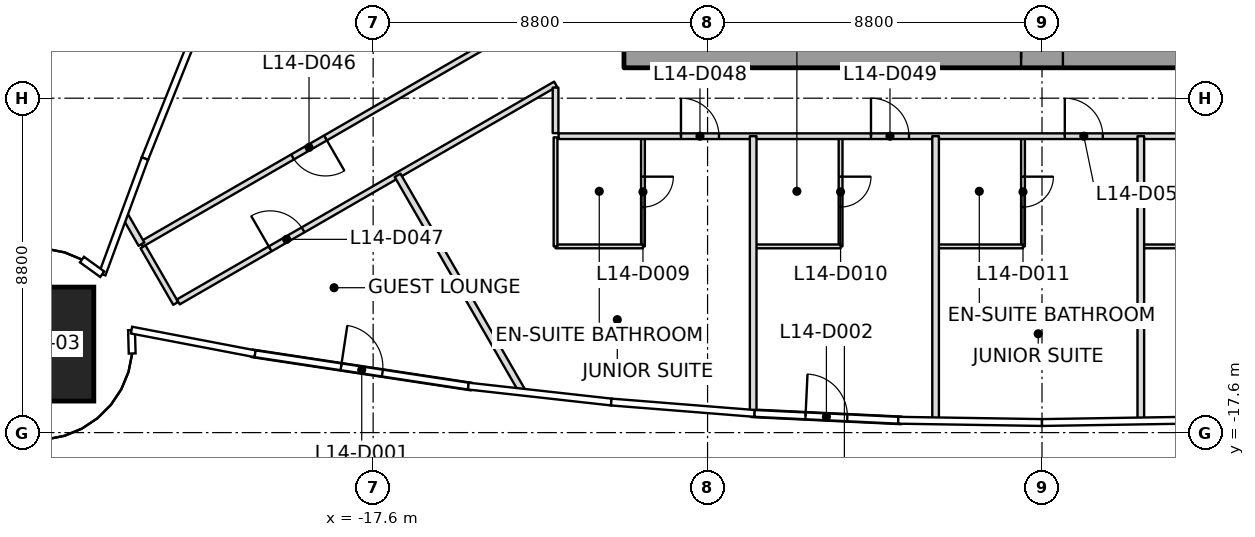
"""IFC4 building model, lengths in metres.
Left out: names, types, materials, properties, quantities, classifications, styles, units other than length and angle.
Written with IfcOpenShell. Run it as: python <this file> out.ifc"""

import sys

from ifc_helpers import new_model, si_unit, direction, frame, frame_2d, origin, origin_2d, place, context, subcontext, project, spatial, rectangle, extrude, element, fill, save


model = new_model("IFC4")
c1 = context("Model", 3, precision=1e-05, world=origin(), true_north=direction((0.0, 1.0)))
c2 = subcontext(c1, "Body", "Model", "MODEL_VIEW")
j1 = project(units=[si_unit("LENGTHUNIT", "METRE"), si_unit("PLANEANGLEUNIT", "RADIAN")], contexts=[c1])
p1 = place(None, origin())
s1 = spatial("IfcSite", under=j1, at=p1, CompositionType="ELEMENT")
p2 = place(p1, origin())
s2 = spatial("IfcBuilding", under=s1, at=p2, CompositionType="ELEMENT")
p3 = place(p2, frame((0.0, 0.0, 73.9)))
s3 = spatial("IfcBuildingStorey", under=s2, at=p3, CompositionType="ELEMENT", Elevation=73.9)
p4 = place(p3, frame((-26.45, -15.271, 0.0), z_axis=(0.030529980019, 0.017605841609, 0.999378784376), x_axis=(0.999533851513, -0.000537756667, -0.030525243614)))
e1 = element("IfcColumn", 1, at=p4, inside=s3, PredefinedType="COLUMN", context=c2, shape_type="SweptSolid", body=[
    extrude(rectangle(XDim=3.0, YDim=3.0, at=origin_2d()), origin(), (0.0, 0.0, 1.0), 3.702),
])
p5 = place(p3, frame((-11.0, -7.75, 0.0), z_axis=(0.0, 0.0, 1.0), x_axis=(1.0, 0.0, 0.0)))
e2 = element("IfcWall", 2, at=p5, inside=s3, PredefinedType="SHEAR", context=c2, shape_type="SweptSolid", body=[
    extrude(rectangle(XDim=22.0, YDim=0.5, at=frame_2d((11.0, 0.0))), origin(), (0.0, 0.0, 1.0), 3.7),
])
p6 = place(p5, frame((10.45, 0.0, 0.0)))
e3 = element("IfcOpeningElement", 3, at=p6, cuts=e2, PredefinedType="OPENING", context=c2, shape_type="SweptSolid", body=[
    extrude(rectangle(XDim=1.1, YDim=2.1, at=frame_2d((0.55, 1.05))), frame((0.0, 0.25, 0.0), z_axis=(0.0, -1.0, 0.0), x_axis=(1.0, 0.0, 0.0)), (0.0, 0.0, 1.0), 0.5),
])
p7 = place(p3, frame((-20.795, -15.512, 0.0), z_axis=(0.0, 0.0, 1.0), x_axis=(0.988688163598, -0.149985716522, 0.0)))
e4 = element("IfcWall", 4, at=p7, inside=s3, PredefinedType="SOLIDWALL", context=c2, shape_type="SweptSolid", body=[
    extrude(rectangle(XDim=5.855, YDim=0.2, at=frame_2d((2.927, 0.0))), origin(), (0.0, 0.0, 1.0), 3.04),
])
p8 = place(p7, frame((2.378, 0.0, 0.0)))
e5 = element("IfcOpeningElement", 5, at=p8, cuts=e4, PredefinedType="OPENING", context=c2, shape_type="SweptSolid", body=[
    extrude(rectangle(XDim=1.1, YDim=2.1, at=frame_2d((0.55, 1.05))), frame((0.0, 0.1, 0.0), z_axis=(0.0, -1.0, 0.0), x_axis=(1.0, 0.0, 0.0)), (0.0, 0.0, 1.0), 0.2),
])
p9 = place(p3, frame((-7.653, -17.091, 0.0), z_axis=(0.0, 0.0, 1.0), x_axis=(0.998868834381, -0.047550517367, 0.0)))
e6 = element("IfcWall", 6, at=p9, inside=s3, PredefinedType="SOLIDWALL", context=c2, shape_type="SweptSolid", body=[
    extrude(rectangle(XDim=3.964, YDim=0.2, at=frame_2d((1.982, 0.0))), origin(), (0.0, 0.0, 1.0), 2.947),
])
p10 = place(p9, frame((1.432, 0.0, 0.0)))
e7 = element("IfcOpeningElement", 7, at=p10, cuts=e6, PredefinedType="OPENING", context=c2, shape_type="SweptSolid", body=[
    extrude(rectangle(XDim=1.1, YDim=2.1, at=frame_2d((0.55, 1.05))), frame((0.0, 0.1, 0.0), z_axis=(0.0, -1.0, 0.0), x_axis=(1.0, 0.0, 0.0)), (0.0, 0.0, 1.0), 0.2),
])
p11 = place(p3, frame((-23.695, -12.641, 0.0), z_axis=(0.0, 0.0, 1.0), x_axis=(-0.500122219575, 0.86595482878, 0.0)))
e8 = element("IfcWall", 8, at=p11, inside=s3, PredefinedType="PARTITIONING", context=c2, shape_type="SweptSolid", body=[
    extrude(rectangle(XDim=0.916, YDim=0.175, at=frame_2d((0.458, 0.0))), origin(), (0.0, 0.0, 1.0), 3.15),
])
p12 = place(p3, frame((-13.655, -16.549, 0.0), z_axis=(0.0, 0.0, 1.0), x_axis=(-0.499999794657, 0.866025522339, 0.0)))
e9 = element("IfcWall", 9, at=p12, inside=s3, PredefinedType="PARTITIONING", context=c2, shape_type="SweptSolid", body=[
    extrude(rectangle(XDim=6.604, YDim=0.175, at=frame_2d((3.302, 0.0))), origin(), (0.0, 0.0, 1.0), 2.797),
])
p13 = place(p3, frame((-7.6, -9.8, 0.0), z_axis=(0.0, 0.0, 1.0), x_axis=(0.0, -1.0, 0.0)))
e10 = element("IfcWall", 10, at=p13, inside=s3, PredefinedType="PARTITIONING", context=c2, shape_type="SweptSolid", body=[
    extrude(rectangle(XDim=7.292, YDim=0.175, at=frame_2d((3.646, 0.0))), origin(), (0.0, 0.0, 1.0), 3.15),
])
p14 = place(p3, frame((-2.8, -9.8, 0.0), z_axis=(0.0, 0.0, 1.0), x_axis=(0.0, -1.0, 0.0)))
e11 = element("IfcWall", 11, at=p14, inside=s3, PredefinedType="PARTITIONING", context=c2, shape_type="SweptSolid", body=[
    extrude(rectangle(XDim=7.498, YDim=0.175, at=frame_2d((3.749, 0.0))), origin(), (0.0, 0.0, 1.0), 3.15),
])
p15 = place(p3, frame((2.6, -9.8, 0.0), z_axis=(0.0, 0.0, 1.0), x_axis=(0.0, -1.0, 0.0)))
e12 = element("IfcWall", 12, at=p15, inside=s3, PredefinedType="PARTITIONING", context=c2, shape_type="SweptSolid", body=[
    extrude(rectangle(XDim=7.503, YDim=0.175, at=frame_2d((3.751, 0.0))), origin(), (0.0, 0.0, 1.0), 3.15),
])
p16 = place(p3, frame((-12.8, -6.351, 0.0), z_axis=(0.0, 0.0, 1.0), x_axis=(-0.866020449901, -0.50000858028, 0.0)))
e13 = element("IfcWall", 13, at=p16, inside=s3, PredefinedType="PARTITIONING", context=c2, shape_type="SweptSolid", body=[
    extrude(rectangle(XDim=12.581, YDim=0.15, at=frame_2d((6.291, 0.0))), origin(), (0.0, 0.0, 1.0), 2.947),
])
p17 = place(p16, frame((6.99, 0.0, 0.0)))
e14 = element("IfcOpeningElement", 14, at=p17, cuts=e13, PredefinedType="OPENING", context=c2, shape_type="SweptSolid", body=[
    extrude(rectangle(XDim=1.0, YDim=2.1, at=frame_2d((0.5, 1.05))), frame((0.0, 0.075, 0.0), z_axis=(0.0, -1.0, 0.0), x_axis=(1.0, 0.0, 0.0)), (0.0, 0.0, 1.0), 0.15),
])
p18 = place(p3, frame((-23.656, -12.711, 0.0), z_axis=(0.0, 0.0, 1.0), x_axis=(0.500062383118, -0.865989383878, 0.0)))
e15 = element("IfcWall", 15, at=p18, inside=s3, PredefinedType="PARTITIONING", context=c2, shape_type="SweptSolid", body=[
    extrude(rectangle(XDim=1.72, YDim=0.15, at=frame_2d((0.86, 0.0))), origin(), (0.0, 0.0, 1.0), 2.797),
])
p19 = place(p3, frame((-22.726, -14.16, 0.0), z_axis=(0.0, 0.0, 1.0), x_axis=(0.866019223041, 0.500010705209, 0.0)))
e16 = element("IfcWall", 16, at=p19, inside=s3, PredefinedType="PARTITIONING", context=c2, shape_type="SweptSolid", body=[
    extrude(rectangle(XDim=11.462, YDim=0.15, at=frame_2d((5.731, 0.0))), origin(), (0.0, 0.0, 1.0), 2.797),
])
p20 = place(p19, frame((2.791, 0.0, 0.0)))
e17 = element("IfcOpeningElement", 17, at=p20, cuts=e16, PredefinedType="OPENING", context=c2, shape_type="SweptSolid", body=[
    extrude(rectangle(XDim=1.0, YDim=2.1, at=frame_2d((0.5, 1.05))), frame((0.0, 0.075, 0.0), z_axis=(0.0, -1.0, 0.0), x_axis=(1.0, 0.0, 0.0)), (0.0, 0.0, 1.0), 0.15),
])
p21 = place(p3, frame((-12.8, -8.521, 0.0), z_axis=(0.0, 0.0, 1.0), x_axis=(0.0, -1.0, 0.0)))
e18 = element("IfcWall", 18, at=p21, inside=s3, PredefinedType="PARTITIONING", context=c2, shape_type="SweptSolid", body=[
    extrude(rectangle(XDim=1.199, YDim=0.15, at=frame_2d((0.6, 0.0))), origin(), (0.0, 0.0, 1.0), 2.797),
])
p22 = place(p3, frame((-12.72, -9.8, 0.0), z_axis=(0.0, 0.0, 1.0), x_axis=(1.0, 0.0, 0.0)))
e19 = element("IfcWall", 19, at=p22, inside=s3, PredefinedType="PARTITIONING", context=c2, shape_type="SweptSolid", body=[
    extrude(rectangle(XDim=25.44, YDim=0.15, at=frame_2d((12.72, 0.0))), origin(), (0.0, 0.0, 1.0), 2.947),
])
p23 = place(p22, frame((3.22, 0.0, 0.0)))
e20 = element("IfcOpeningElement", 20, at=p23, cuts=e19, PredefinedType="OPENING", context=c2, shape_type="SweptSolid", body=[
    extrude(rectangle(XDim=1.0, YDim=2.1, at=frame_2d((0.5, 1.05))), frame((0.0, 0.075, 0.0), z_axis=(0.0, -1.0, 0.0), x_axis=(1.0, 0.0, 0.0)), (0.0, 0.0, 1.0), 0.15),
])
p24 = place(p22, frame((8.22, 0.0, 0.0)))
e21 = element("IfcOpeningElement", 21, at=p24, cuts=e19, PredefinedType="OPENING", context=c2, shape_type="SweptSolid", body=[
    extrude(rectangle(XDim=1.0, YDim=2.1, at=frame_2d((0.5, 1.05))), frame((0.0, 0.075, 0.0), z_axis=(0.0, -1.0, 0.0), x_axis=(1.0, 0.0, 0.0)), (0.0, 0.0, 1.0), 0.15),
])
p25 = place(p22, frame((13.32, 0.0, 0.0)))
e22 = element("IfcOpeningElement", 22, at=p25, cuts=e19, PredefinedType="OPENING", context=c2, shape_type="SweptSolid", body=[
    extrude(rectangle(XDim=1.0, YDim=2.1, at=frame_2d((0.5, 1.05))), frame((0.0, 0.075, 0.0), z_axis=(0.0, -1.0, 0.0), x_axis=(1.0, 0.0, 0.0)), (0.0, 0.0, 1.0), 0.15),
])
p26 = place(p22, frame((18.72, 0.0, 0.0)))
e23 = element("IfcOpeningElement", 23, at=p26, cuts=e19, PredefinedType="OPENING", context=c2, shape_type="SweptSolid", body=[
    extrude(rectangle(XDim=1.0, YDim=2.1, at=frame_2d((0.5, 1.05))), frame((0.0, 0.075, 0.0), z_axis=(0.0, -1.0, 0.0), x_axis=(1.0, 0.0, 0.0)), (0.0, 0.0, 1.0), 0.15),
])
p27 = place(p22, frame((23.82, 0.0, 0.0)))
e24 = element("IfcOpeningElement", 24, at=p27, cuts=e19, PredefinedType="OPENING", context=c2, shape_type="SweptSolid", body=[
    extrude(rectangle(XDim=1.0, YDim=2.1, at=frame_2d((0.5, 1.05))), frame((0.0, 0.075, 0.0), z_axis=(0.0, -1.0, 0.0), x_axis=(1.0, 0.0, 0.0)), (0.0, 0.0, 1.0), 0.15),
])
p28 = place(p3, frame((-10.5, -9.83, 0.0), z_axis=(0.0, 0.0, 1.0), x_axis=(0.0, -1.0, 0.0)))
e25 = element("IfcWall", 25, at=p28, inside=s3, PredefinedType="PARTITIONING", context=c2, shape_type="SweptSolid", body=[
    extrude(rectangle(XDim=2.87, YDim=0.1, at=frame_2d((1.435, 0.0))), origin(), (0.0, 0.0, 1.0), 3.15),
])
p29 = place(p28, frame((1.035, 0.0, 0.0)))
e26 = element("IfcOpeningElement", 26, at=p29, cuts=e25, PredefinedType="OPENING", context=c2, shape_type="SweptSolid", body=[
    extrude(rectangle(XDim=0.8, YDim=2.1, at=frame_2d((0.4, 1.05))), frame((0.0, 0.05, 0.0), z_axis=(0.0, -1.0, 0.0), x_axis=(1.0, 0.0, 0.0)), (0.0, 0.0, 1.0), 0.1),
])
p30 = place(p3, frame((-10.5, -12.7, 0.0), z_axis=(0.0, 0.0, 1.0), x_axis=(-1.0, 0.0, 0.0)))
e27 = element("IfcWall", 27, at=p30, inside=s3, PredefinedType="PARTITIONING", context=c2, shape_type="SweptSolid", body=[
    extrude(rectangle(XDim=2.3, YDim=0.1, at=frame_2d((1.15, 0.0))), origin(), (0.0, 0.0, 1.0), 3.017),
])
p31 = place(p3, frame((-12.8, -12.7, 0.0), z_axis=(0.0, 0.0, 1.0), x_axis=(0.0, 1.0, 0.0)))
e28 = element("IfcWall", 28, at=p31, inside=s3, PredefinedType="PARTITIONING", context=c2, shape_type="SweptSolid", body=[
    extrude(rectangle(XDim=2.87, YDim=0.1, at=frame_2d((1.435, 0.0))), origin(), (0.0, 0.0, 1.0), 3.15),
])
p32 = place(p3, frame((-5.3, -9.83, 0.0), z_axis=(0.0, 0.0, 1.0), x_axis=(0.0, -1.0, 0.0)))
e29 = element("IfcWall", 29, at=p32, inside=s3, PredefinedType="PARTITIONING", context=c2, shape_type="SweptSolid", body=[
    extrude(rectangle(XDim=2.87, YDim=0.1, at=frame_2d((1.435, 0.0))), origin(), (0.0, 0.0, 1.0), 3.15),
])
p33 = place(p32, frame((1.035, 0.0, 0.0)))
e30 = element("IfcOpeningElement", 30, at=p33, cuts=e29, PredefinedType="OPENING", context=c2, shape_type="SweptSolid", body=[
    extrude(rectangle(XDim=0.8, YDim=2.1, at=frame_2d((0.4, 1.05))), frame((0.0, 0.05, 0.0), z_axis=(0.0, -1.0, 0.0), x_axis=(1.0, 0.0, 0.0)), (0.0, 0.0, 1.0), 0.1),
])
p34 = place(p3, frame((-5.3, -12.7, 0.0), z_axis=(0.0, 0.0, 1.0), x_axis=(-1.0, 0.0, 0.0)))
e31 = element("IfcWall", 31, at=p34, inside=s3, PredefinedType="PARTITIONING", context=c2, shape_type="SweptSolid", body=[
    extrude(rectangle(XDim=2.27, YDim=0.1, at=frame_2d((1.135, 0.0))), origin(), (0.0, 0.0, 1.0), 3.15),
])
p35 = place(p3, frame((-0.5, -9.83, 0.0), z_axis=(0.0, 0.0, 1.0), x_axis=(0.0, -1.0, 0.0)))
e32 = element("IfcWall", 32, at=p35, inside=s3, PredefinedType="PARTITIONING", context=c2, shape_type="SweptSolid", body=[
    extrude(rectangle(XDim=2.87, YDim=0.1, at=frame_2d((1.435, 0.0))), origin(), (0.0, 0.0, 1.0), 3.15),
])
p36 = place(p35, frame((1.035, 0.0, 0.0)))
e33 = element("IfcOpeningElement", 33, at=p36, cuts=e32, PredefinedType="OPENING", context=c2, shape_type="SweptSolid", body=[
    extrude(rectangle(XDim=0.8, YDim=2.1, at=frame_2d((0.4, 1.05))), frame((0.0, 0.05, 0.0), z_axis=(0.0, -1.0, 0.0), x_axis=(1.0, 0.0, 0.0)), (0.0, 0.0, 1.0), 0.1),
])
for number, where, z_axis, x_axis in (
    (34, (-0.5, -12.7, 0.0), (0.0, 0.0, 1.0), (-1.0, 0.0, 0.0)),
    (35, (4.9, -12.7, 0.0), (0.0, 0.0, 1.0), (-1.0, 0.0, 0.0)),
):
    element("IfcWall", number, at=place(p3, frame(where, z_axis=z_axis, x_axis=x_axis)), inside=s3, PredefinedType="PARTITIONING", context=c2, shape_type="SweptSolid", body=[
        extrude(rectangle(XDim=2.27, YDim=0.1, at=frame_2d((1.135, 0.0))), origin(), (0.0, 0.0, 1.0), 2.947),
    ])
p37 = place(p8, origin())
e36 = element("IfcDoor", 36, at=p37, inside=s3, OperationType="SINGLE_SWING_RIGHT", PredefinedType="DOOR", context=c2, shape_type="SweptSolid", body=[
    extrude(rectangle(XDim=1.1, YDim=2.1, at=frame_2d((0.55, 1.05))), frame((0.0, 0.025, 0.0), z_axis=(0.0, -1.0, 0.0), x_axis=(1.0, 0.0, 0.0)), (0.0, 0.0, 1.0), 0.05),
])
fill(e5, e36)
p38 = place(p10, origin())
e37 = element("IfcDoor", 37, at=p38, inside=s3, OperationType="SINGLE_SWING_RIGHT", PredefinedType="DOOR", context=c2, shape_type="SweptSolid", body=[
    extrude(rectangle(XDim=1.1, YDim=2.1, at=frame_2d((0.55, 1.05))), frame((0.0, 0.025, 0.0), z_axis=(0.0, -1.0, 0.0), x_axis=(1.0, 0.0, 0.0)), (0.0, 0.0, 1.0), 0.05),
])
fill(e7, e37)
p39 = place(p17, origin())
e38 = element("IfcDoor", 38, at=p39, inside=s3, OperationType="SINGLE_SWING_RIGHT", PredefinedType="DOOR", context=c2, shape_type="SweptSolid", body=[
    extrude(rectangle(XDim=1.0, YDim=2.1, at=frame_2d((0.5, 1.05))), frame((0.0, 0.025, 0.0), z_axis=(0.0, -1.0, 0.0), x_axis=(1.0, 0.0, 0.0)), (0.0, 0.0, 1.0), 0.05),
])
fill(e14, e38)
p40 = place(p20, origin())
e39 = element("IfcDoor", 39, at=p40, inside=s3, OperationType="SINGLE_SWING_LEFT", PredefinedType="DOOR", context=c2, shape_type="SweptSolid", body=[
    extrude(rectangle(XDim=1.0, YDim=2.1, at=frame_2d((0.5, 1.05))), frame((0.0, 0.025, 0.0), z_axis=(0.0, -1.0, 0.0), x_axis=(1.0, 0.0, 0.0)), (0.0, 0.0, 1.0), 0.05),
])
fill(e17, e39)
p41 = place(p23, origin())
e40 = element("IfcDoor", 40, at=p41, inside=s3, OperationType="SINGLE_SWING_LEFT", PredefinedType="DOOR", context=c2, shape_type="SweptSolid", body=[
    extrude(rectangle(XDim=1.0, YDim=2.1, at=frame_2d((0.5, 1.05))), frame((0.0, 0.025, 0.0), z_axis=(0.0, -1.0, 0.0), x_axis=(1.0, 0.0, 0.0)), (0.0, 0.0, 1.0), 0.05),
])
fill(e20, e40)
p42 = place(p29, origin())
e41 = element("IfcDoor", 41, at=p42, inside=s3, OperationType="SINGLE_SWING_RIGHT", PredefinedType="DOOR", context=c2, shape_type="SweptSolid", body=[
    extrude(rectangle(XDim=0.8, YDim=2.1, at=frame_2d((0.4, 1.05))), frame((0.0, 0.025, 0.0), z_axis=(0.0, -1.0, 0.0), x_axis=(1.0, 0.0, 0.0)), (0.0, 0.0, 1.0), 0.05),
])
fill(e26, e41)
p43 = place(p24, origin())
e42 = element("IfcDoor", 42, at=p43, inside=s3, OperationType="SINGLE_SWING_LEFT", PredefinedType="DOOR", context=c2, shape_type="SweptSolid", body=[
    extrude(rectangle(XDim=1.0, YDim=2.1, at=frame_2d((0.5, 1.05))), frame((0.0, 0.025, 0.0), z_axis=(0.0, -1.0, 0.0), x_axis=(1.0, 0.0, 0.0)), (0.0, 0.0, 1.0), 0.05),
])
fill(e21, e42)
p44 = place(p33, origin())
e43 = element("IfcDoor", 43, at=p44, inside=s3, OperationType="SINGLE_SWING_RIGHT", PredefinedType="DOOR", context=c2, shape_type="SweptSolid", body=[
    extrude(rectangle(XDim=0.8, YDim=2.1, at=frame_2d((0.4, 1.05))), frame((0.0, 0.025, 0.0), z_axis=(0.0, -1.0, 0.0), x_axis=(1.0, 0.0, 0.0)), (0.0, 0.0, 1.0), 0.05),
])
fill(e30, e43)
p45 = place(p25, origin())
e44 = element("IfcDoor", 44, at=p45, inside=s3, OperationType="SINGLE_SWING_LEFT", PredefinedType="DOOR", context=c2, shape_type="SweptSolid", body=[
    extrude(rectangle(XDim=1.0, YDim=2.1, at=frame_2d((0.5, 1.05))), frame((0.0, 0.025, 0.0), z_axis=(0.0, -1.0, 0.0), x_axis=(1.0, 0.0, 0.0)), (0.0, 0.0, 1.0), 0.05),
])
fill(e22, e44)
p46 = place(p36, origin())
e45 = element("IfcDoor", 45, at=p46, inside=s3, OperationType="SINGLE_SWING_LEFT", PredefinedType="DOOR", context=c2, shape_type="SweptSolid", body=[
    extrude(rectangle(XDim=0.8, YDim=2.1, at=frame_2d((0.4, 1.05))), frame((0.0, 0.025, 0.0), z_axis=(0.0, -1.0, 0.0), x_axis=(1.0, 0.0, 0.0)), (0.0, 0.0, 1.0), 0.05),
])
fill(e33, e45)
p47 = place(p6, origin())
e46 = element("IfcDoor", 46, at=p47, inside=s3, OperationType="SINGLE_SWING_RIGHT", PredefinedType="DOOR", context=c2, shape_type="SweptSolid", body=[
    extrude(rectangle(XDim=1.1, YDim=2.1, at=frame_2d((0.55, 1.05))), frame((0.0, 0.025, 0.0), z_axis=(0.0, -1.0, 0.0), x_axis=(1.0, 0.0, 0.0)), (0.0, 0.0, 1.0), 0.05),
])
fill(e3, e46)
save(model, sys.argv[1])
